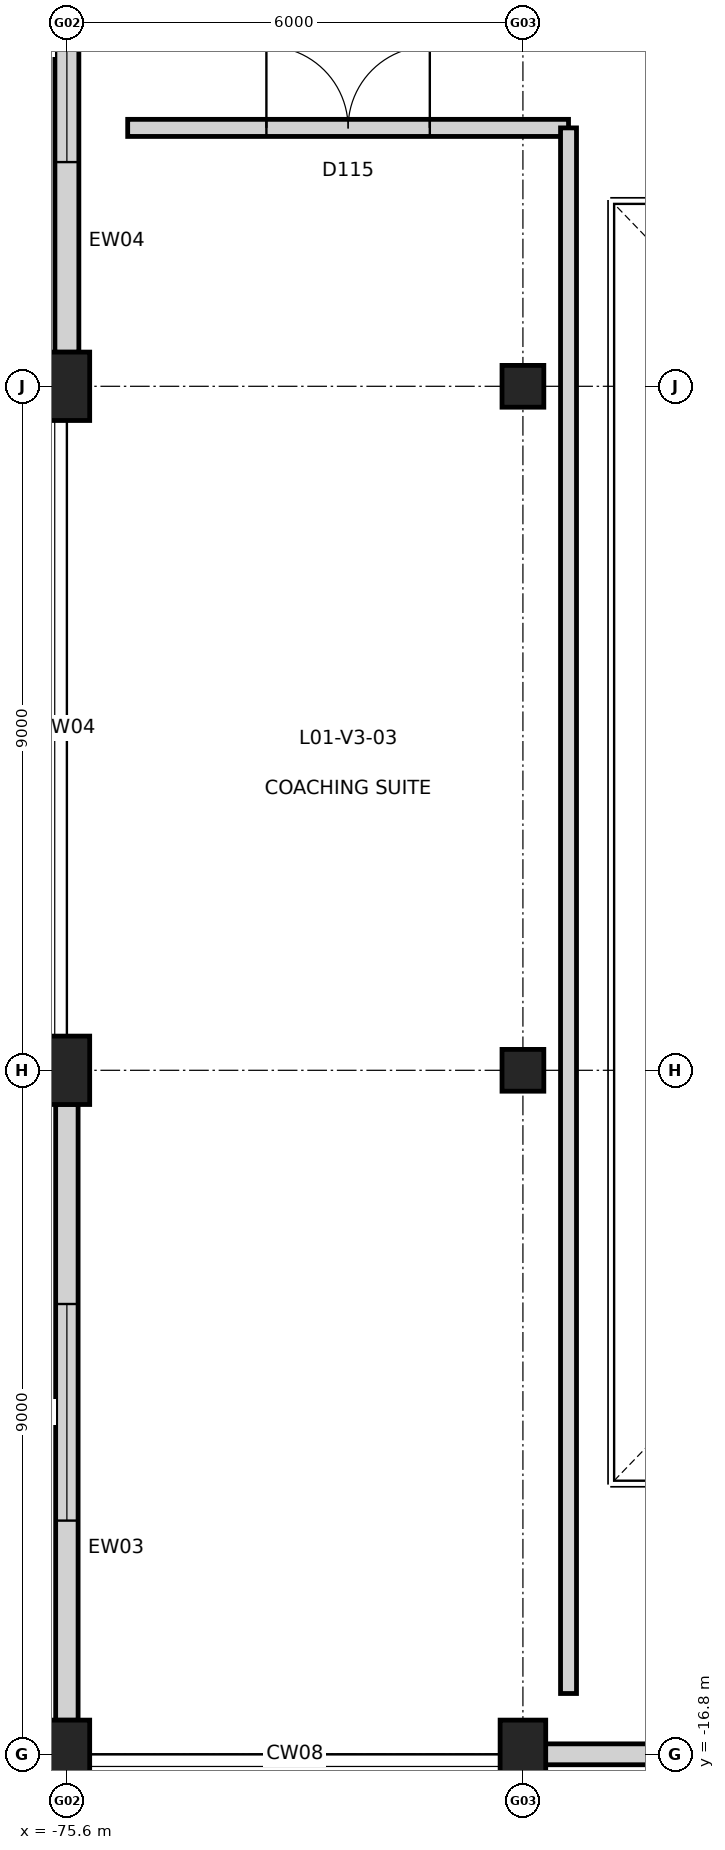
"""IFC4 building model, lengths in metres.
Left out: names, types, materials, properties, quantities, classifications, styles, units other than length and angle.
Written with IfcOpenShell. Run it as: python <this file> out.ifc"""

import sys

from ifc_helpers import new_model, si_unit, direction, frame, frame_2d, origin, origin_2d, place, context, subcontext, project, spatial, rectangle, extrude, element, fill, save


model = new_model("IFC4")
c1 = context("Model", 3, precision=1e-05, world=origin(), true_north=direction((0.0, 1.0)))
c2 = subcontext(c1, "Body", "Model", "MODEL_VIEW")
j1 = project(units=[si_unit("LENGTHUNIT", "METRE"), si_unit("PLANEANGLEUNIT", "RADIAN")], contexts=[c1])
p1 = place(None, origin())
s1 = spatial("IfcSite", under=j1, at=p1, CompositionType="ELEMENT")
p2 = place(p1, origin())
s2 = spatial("IfcBuilding", under=s1, at=p2, CompositionType="ELEMENT")
p3 = place(p2, frame((0.0, 0.0, 5.4)))
s3 = spatial("IfcBuildingStorey", under=s2, at=p3, CompositionType="ELEMENT", Elevation=5.4)
for number, where, z_axis, x_axis in (
    (1, (-75.6, -16.8, 0.0), (0.0, 0.0, 1.0), (1.0, 0.0, 0.0)),
    (2, (-75.6, -7.8, 0.0), (0.0, 0.0, 1.0), (1.0, 0.0, 0.0)),
    (3, (-75.6, 1.2, 0.0), (0.0, 0.0, 1.0), (1.0, 0.0, 0.0)),
    (4, (-69.6, -16.8, 0.0), (0.0, 0.0, 1.0), (1.0, 0.0, 0.0)),
):
    element("IfcColumn", number, at=place(p3, frame(where, z_axis=z_axis, x_axis=x_axis)), inside=s3, PredefinedType="COLUMN", context=c2, shape_type="SweptSolid", body=[
        extrude(rectangle(XDim=0.6, YDim=0.9, at=origin_2d()), origin(), (0.0, 0.0, 1.0), 4.8),
    ])
for number, where, z_axis, x_axis in (
    (5, (-69.6, -7.8, 0.0), (0.0, 0.0, 1.0), (1.0, 0.0, 0.0)),
    (6, (-69.6, 1.2, 0.0), (0.0, 0.0, 1.0), (1.0, 0.0, 0.0)),
):
    element("IfcColumn", number, at=place(p3, frame(where, z_axis=z_axis, x_axis=x_axis)), inside=s3, PredefinedType="COLUMN", context=c2, shape_type="SweptSolid", body=[
        extrude(rectangle(XDim=0.55, YDim=0.55, at=origin_2d()), origin(), (0.0, 0.0, 1.0), 4.8),
    ])
p4 = place(p3, frame((-63.898, -16.8, 0.0), z_axis=(0.0, 0.0, 1.0), x_axis=(-1.0, 0.0, 0.0)))
e7 = element("IfcWall", 7, at=p4, inside=s3, PredefinedType="STANDARD", context=c2, shape_type="SweptSolid", body=[
    extrude(rectangle(XDim=5.404, YDim=0.275, at=frame_2d((2.702, 0.0))), origin(), (0.0, 0.0, 1.0), 3.74),
])
p5 = place(p4, frame((1.452, 0.0, 0.85)))
e8 = element("IfcOpeningElement", 8, at=p5, cuts=e7, PredefinedType="OPENING", context=c2, shape_type="SweptSolid", body=[
    extrude(rectangle(XDim=2.5, YDim=2.1, at=frame_2d((1.25, 1.05))), frame((0.0, 0.147, 0.0), z_axis=(0.0, -1.0, 0.0), x_axis=(1.0, 0.0, 0.0)), (0.0, 0.0, 1.0), 0.295),
])
p6 = place(p3, frame((-75.6, -16.352, 0.0), z_axis=(0.0, 0.0, 1.0), x_axis=(0.0, 1.0, 0.0)))
e9 = element("IfcWall", 9, at=p6, inside=s3, PredefinedType="STANDARD", context=c2, shape_type="SweptSolid", body=[
    extrude(rectangle(XDim=8.104, YDim=0.295, at=frame_2d((4.052, 0.0))), origin(), (0.0, 0.0, 1.0), 3.824),
])
p7 = place(p6, frame((2.627, 0.0, 0.85)))
e10 = element("IfcOpeningElement", 10, at=p7, cuts=e9, PredefinedType="OPENING", context=c2, shape_type="SweptSolid", body=[
    extrude(rectangle(XDim=2.85, YDim=2.1, at=frame_2d((1.425, 1.05))), frame((0.0, 0.157, 0.0), z_axis=(0.0, -1.0, 0.0), x_axis=(1.0, 0.0, 0.0)), (0.0, 0.0, 1.0), 0.315),
])
p8 = place(p3, frame((-75.6, 1.648, 0.0), z_axis=(0.0, 0.0, 1.0), x_axis=(0.0, 1.0, 0.0)))
e11 = element("IfcWall", 11, at=p8, inside=s3, PredefinedType="STANDARD", context=c2, shape_type="SweptSolid", body=[
    extrude(rectangle(XDim=8.104, YDim=0.315, at=frame_2d((4.052, 0.0))), origin(), (0.0, 0.0, 1.0), 3.824),
])
p9 = place(p8, frame((2.502, 0.0, 0.85)))
e12 = element("IfcOpeningElement", 12, at=p9, cuts=e11, PredefinedType="OPENING", context=c2, shape_type="SweptSolid", body=[
    extrude(rectangle(XDim=3.1, YDim=2.1, at=frame_2d((1.55, 1.05))), frame((0.0, 0.167, 0.0), z_axis=(0.0, -1.0, 0.0), x_axis=(1.0, 0.0, 0.0)), (0.0, 0.0, 1.0), 0.335),
])
p10 = place(p3, frame((-74.8, 4.6, 0.0), z_axis=(0.0, 0.0, 1.0), x_axis=(1.0, 0.0, 0.0)))
e13 = element("IfcWall", 13, at=p10, inside=s3, PredefinedType="PARTITIONING", context=c2, shape_type="SweptSolid", body=[
    extrude(rectangle(XDim=5.8, YDim=0.225, at=frame_2d((2.9, 0.0))), origin(), (0.0, 0.0, 1.0), 4.42),
])
p11 = place(p10, frame((1.825, 0.0, 0.0)))
e14 = element("IfcOpeningElement", 14, at=p11, cuts=e13, PredefinedType="OPENING", context=c2, shape_type="SweptSolid", body=[
    extrude(rectangle(XDim=2.15, YDim=2.4, at=frame_2d((1.075, 1.2))), frame((0.0, 0.123, 0.0), z_axis=(0.0, -1.0, 0.0), x_axis=(1.0, 0.0, 0.0)), (0.0, 0.0, 1.0), 0.245),
])
p12 = place(p3, frame((-69.0, -16.0, 0.0), z_axis=(0.0, 0.0, 1.0), x_axis=(0.0, 1.0, 0.0)))
e15 = element("IfcWall", 15, at=p12, inside=s3, PredefinedType="PARTITIONING", context=c2, shape_type="SweptSolid", body=[
    extrude(rectangle(XDim=20.6, YDim=0.21, at=frame_2d((10.3, 0.0))), origin(), (0.0, 0.0, 1.0), 4.42),
])
p13 = place(p7, origin())
e16 = element("IfcWindow", 16, at=p13, inside=s3, PartitioningType="SINGLE_PANEL", PredefinedType="WINDOW", context=c2, shape_type="SweptSolid", body=[
    extrude(rectangle(XDim=2.85, YDim=2.1, at=frame_2d((1.425, 1.05))), frame((0.0, 0.03, 0.0), z_axis=(0.0, -1.0, 0.0), x_axis=(1.0, 0.0, 0.0)), (0.0, 0.0, 1.0), 0.06),
])
fill(e10, e16)
p14 = place(p9, origin())
e17 = element("IfcWindow", 17, at=p14, inside=s3, PartitioningType="SINGLE_PANEL", PredefinedType="WINDOW", context=c2, shape_type="SweptSolid", body=[
    extrude(rectangle(XDim=3.1, YDim=2.1, at=frame_2d((1.55, 1.05))), frame((0.0, 0.03, 0.0), z_axis=(0.0, -1.0, 0.0), x_axis=(1.0, 0.0, 0.0)), (0.0, 0.0, 1.0), 0.06),
])
fill(e12, e17)
p15 = place(p11, origin())
e18 = element("IfcDoor", 18, at=p15, inside=s3, OperationType="DOUBLE_DOOR_SINGLE_SWING", PredefinedType="DOOR", context=c2, shape_type="SweptSolid", body=[
    extrude(rectangle(XDim=2.15, YDim=2.4, at=frame_2d((1.075, 1.2))), frame((0.0, 0.025, 0.0), z_axis=(0.0, -1.0, 0.0), x_axis=(1.0, 0.0, 0.0)), (0.0, 0.0, 1.0), 0.05),
])
fill(e14, e18)
save(model, sys.argv[1])
